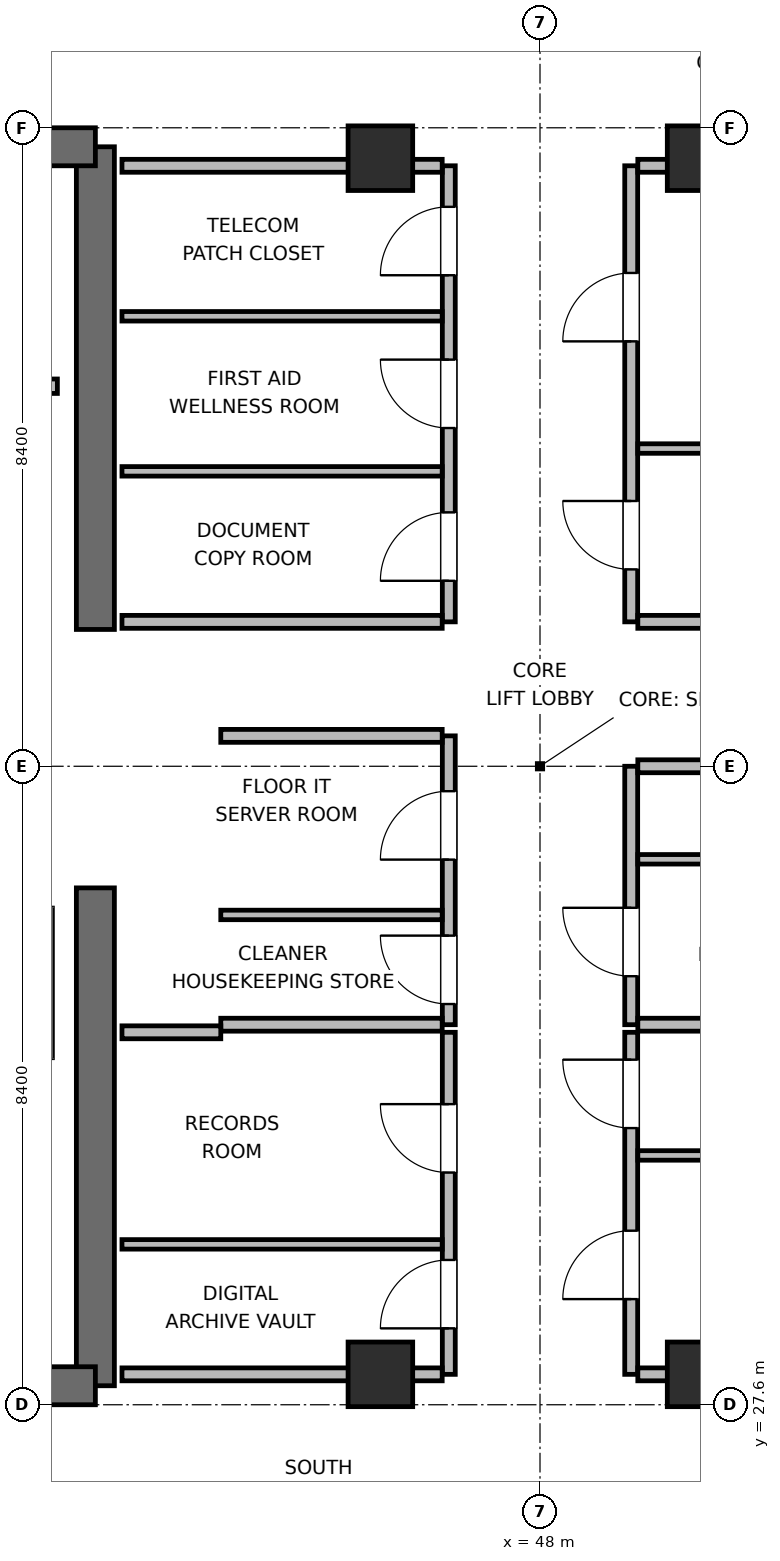
"""IFC4 building model, lengths in metres.
Left out: names, types, materials, properties, quantities, classifications, styles, units other than length and angle.
Written with IfcOpenShell. Run it as: python <this file> out.ifc"""

import sys

from ifc_helpers import new_model, si_unit, direction, frame, frame_2d, origin, origin_2d, place, context, subcontext, project, spatial, rectangle, extrude, element, fill, save


model = new_model("IFC4")
c1 = context("Model", 3, precision=1e-05, world=origin(), true_north=direction((0.0, 1.0)))
c2 = subcontext(c1, "Body", "Model", "MODEL_VIEW")
j1 = project(units=[si_unit("LENGTHUNIT", "METRE"), si_unit("PLANEANGLEUNIT", "RADIAN")], contexts=[c1])
p1 = place(None, origin())
s1 = spatial("IfcSite", under=j1, at=p1, CompositionType="ELEMENT")
p2 = place(p1, origin())
s2 = spatial("IfcBuilding", under=s1, at=p2, CompositionType="ELEMENT")
p3 = place(p2, frame((0.0, 0.0, 274.5)))
s3 = spatial("IfcBuildingStorey", under=s2, at=p3, CompositionType="ELEMENT", Elevation=274.5)
p4 = place(p3, frame((42.15, 27.85, 0.0), z_axis=(0.0, 0.0, 1.0), x_axis=(0.0, 1.0, 0.0)))
e1 = element("IfcWall", 1, at=p4, inside=s3, PredefinedType="SHEAR", context=c2, shape_type="SweptSolid", body=[
    extrude(rectangle(XDim=6.55, YDim=0.5, at=frame_2d((3.275, 0.0))), origin(), (0.0, 0.0, 1.0), 3.9),
])
p5 = place(p3, frame((42.15, 37.8, 0.0), z_axis=(0.0, 0.0, 1.0), x_axis=(0.0, 1.0, 0.0)))
e2 = element("IfcWall", 2, at=p5, inside=s3, PredefinedType="SHEAR", context=c2, shape_type="SweptSolid", body=[
    extrude(rectangle(XDim=6.35, YDim=0.5, at=frame_2d((3.175, 0.0))), origin(), (0.0, 0.0, 1.0), 3.9),
])
p6 = place(p3, frame((32.65, 27.85, 0.0), z_axis=(0.0, 0.0, 1.0), x_axis=(1.0, 0.0, 0.0)))
e3 = element("IfcWall", 3, at=p6, inside=s3, PredefinedType="SHEAR", context=c2, shape_type="SweptSolid", body=[
    extrude(rectangle(XDim=9.5, YDim=0.5, at=frame_2d((4.75, 0.0))), origin(), (0.0, 0.0, 1.0), 3.9),
])
p7 = place(p6, frame((5.075, 0.0, 0.0)))
e4 = element("IfcOpeningElement", 4, at=p7, cuts=e3, PredefinedType="OPENING", context=c2, shape_type="SweptSolid", body=[
    extrude(rectangle(XDim=1.05, YDim=2.04, at=frame_2d((0.525, 1.02))), frame((0.0, 0.26, 0.0), z_axis=(0.0, -1.0, 0.0), x_axis=(1.0, 0.0, 0.0)), (0.0, 0.0, 1.0), 0.52),
])
p8 = place(p3, frame((32.65, 44.15, 0.0), z_axis=(0.0, 0.0, 1.0), x_axis=(1.0, 0.0, 0.0)))
e5 = element("IfcWall", 5, at=p8, inside=s3, PredefinedType="SHEAR", context=c2, shape_type="SweptSolid", body=[
    extrude(rectangle(XDim=9.5, YDim=0.5, at=frame_2d((4.75, 0.0))), origin(), (0.0, 0.0, 1.0), 3.9),
])
p9 = place(p8, frame((1.075, 0.0, 0.0)))
e6 = element("IfcOpeningElement", 6, at=p9, cuts=e5, PredefinedType="OPENING", context=c2, shape_type="SweptSolid", body=[
    extrude(rectangle(XDim=0.95, YDim=2.04, at=frame_2d((0.475, 1.02))), frame((0.0, 0.26, 0.0), z_axis=(0.0, -1.0, 0.0), x_axis=(1.0, 0.0, 0.0)), (0.0, 0.0, 1.0), 0.52),
])
p10 = place(p8, frame((4.325, 0.0, 0.0)))
e7 = element("IfcOpeningElement", 7, at=p10, cuts=e5, PredefinedType="OPENING", context=c2, shape_type="SweptSolid", body=[
    extrude(rectangle(XDim=0.9, YDim=2.02, at=frame_2d((0.45, 1.01))), frame((0.0, 0.26, 0.0), z_axis=(0.0, -1.0, 0.0), x_axis=(1.0, 0.0, 0.0)), (0.0, 0.0, 1.0), 0.52),
])
p11 = place(p8, frame((7.225, 0.0, 0.0)))
e8 = element("IfcOpeningElement", 8, at=p11, cuts=e5, PredefinedType="OPENING", context=c2, shape_type="SweptSolid", body=[
    extrude(rectangle(XDim=0.9, YDim=2.02, at=frame_2d((0.45, 1.01))), frame((0.0, 0.26, 0.0), z_axis=(0.0, -1.0, 0.0), x_axis=(1.0, 0.0, 0.0)), (0.0, 0.0, 1.0), 0.52),
])
for number, where, z_axis, x_axis in (
    (9, (45.9, 28.0, 0.0), (0.0, 0.0, 1.0), (1.0, 0.0, 0.0)),
    (10, (50.1, 28.0, 0.0), (0.0, 0.0, 1.0), (1.0, 0.0, 0.0)),
    (11, (45.9, 44.0, 0.0), (0.0, 0.0, 1.0), (1.0, 0.0, 0.0)),
    (12, (50.1, 44.0, 0.0), (0.0, 0.0, 1.0), (1.0, 0.0, 0.0)),
):
    element("IfcColumn", number, at=place(p3, frame(where, z_axis=z_axis, x_axis=x_axis)), inside=s3, PredefinedType="COLUMN", context=c2, shape_type="SweptSolid", body=[
        extrude(rectangle(XDim=0.85, YDim=0.85, at=origin_2d()), origin(), (0.0, 0.0, 1.0), 3.9),
    ])
p12 = place(p3, frame((33.15, 41.0, 0.0), z_axis=(0.0, 0.0, 1.0), x_axis=(1.0, 0.0, 0.0)))
e13 = element("IfcWall", 13, at=p12, inside=s3, PredefinedType="PLUMBINGWALL", context=c2, shape_type="SweptSolid", body=[
    extrude(rectangle(XDim=8.5, YDim=0.19, at=frame_2d((4.25, 0.0))), origin(), (0.0, 0.0, 1.0), 3.68),
])
p13 = place(p3, frame((46.8, 32.6, 0.0), z_axis=(0.0, 0.0, 1.0), x_axis=(0.0, 1.0, 0.0)))
e14 = element("IfcWall", 14, at=p13, inside=s3, PredefinedType="PARTITIONING", context=c2, shape_type="SweptSolid", body=[
    extrude(rectangle(XDim=3.8, YDim=0.17, at=frame_2d((1.9, 0.0))), origin(), (0.0, 0.0, 1.0), 3.68),
])
p14 = place(p13, frame((0.272, 0.0, 0.0)))
e15 = element("IfcOpeningElement", 15, at=p14, cuts=e14, PredefinedType="OPENING", context=c2, shape_type="SweptSolid", body=[
    extrude(rectangle(XDim=0.9, YDim=2.02, at=frame_2d((0.45, 1.01))), frame((0.0, 0.095, 0.0), z_axis=(0.0, -1.0, 0.0), x_axis=(1.0, 0.0, 0.0)), (0.0, 0.0, 1.0), 0.19),
])
p15 = place(p13, frame((2.172, 0.0, 0.0)))
e16 = element("IfcOpeningElement", 16, at=p15, cuts=e14, PredefinedType="OPENING", context=c2, shape_type="SweptSolid", body=[
    extrude(rectangle(XDim=0.9, YDim=2.02, at=frame_2d((0.45, 1.01))), frame((0.0, 0.095, 0.0), z_axis=(0.0, -1.0, 0.0), x_axis=(1.0, 0.0, 0.0)), (0.0, 0.0, 1.0), 0.19),
])
for number, where, z_axis, x_axis in (
    (17, (43.8, 32.6, 0.0), (0.0, 0.0, 1.0), (1.0, 0.0, 0.0)),
    (18, (43.8, 36.4, 0.0), (0.0, 0.0, 1.0), (1.0, 0.0, 0.0)),
):
    element("IfcWall", number, at=place(p3, frame(where, z_axis=z_axis, x_axis=x_axis)), inside=s3, PredefinedType="PARTITIONING", context=c2, shape_type="SweptSolid", body=[
        extrude(rectangle(XDim=2.913, YDim=0.17, at=frame_2d((1.457, 0.0))), origin(), (0.0, 0.0, 1.0), 3.68),
    ])
p16 = place(p3, frame((43.8, 34.044, 0.0), z_axis=(0.0, 0.0, 1.0), x_axis=(1.0, 0.0, 0.0)))
e19 = element("IfcWall", 19, at=p16, inside=s3, PredefinedType="PARTITIONING", context=c2, shape_type="SweptSolid", body=[
    extrude(rectangle(XDim=2.913, YDim=0.125, at=frame_2d((1.457, 0.0))), origin(), (0.0, 0.0, 1.0), 3.68),
])
p17 = place(p3, frame((49.2, 32.6, 0.0), z_axis=(0.0, 0.0, 1.0), x_axis=(0.0, 1.0, 0.0)))
e20 = element("IfcWall", 20, at=p17, inside=s3, PredefinedType="PARTITIONING", context=c2, shape_type="SweptSolid", body=[
    extrude(rectangle(XDim=3.4, YDim=0.17, at=frame_2d((1.7, 0.0))), origin(), (0.0, 0.0, 1.0), 3.68),
])
p18 = place(p17, frame((0.638, 0.0, 0.0)))
e21 = element("IfcOpeningElement", 21, at=p18, cuts=e20, PredefinedType="OPENING", context=c2, shape_type="SweptSolid", body=[
    extrude(rectangle(XDim=0.9, YDim=2.02, at=frame_2d((0.45, 1.01))), frame((0.0, 0.095, 0.0), z_axis=(0.0, -1.0, 0.0), x_axis=(1.0, 0.0, 0.0)), (0.0, 0.0, 1.0), 0.19),
])
for number, where, z_axis, x_axis in (
    (22, (49.287, 32.6, 0.0), (0.0, 0.0, 1.0), (1.0, 0.0, 0.0)),
    (23, (49.287, 36.0, 0.0), (0.0, 0.0, 1.0), (1.0, 0.0, 0.0)),
):
    element("IfcWall", number, at=place(p3, frame(where, z_axis=z_axis, x_axis=x_axis)), inside=s3, PredefinedType="PARTITIONING", context=c2, shape_type="SweptSolid", body=[
        extrude(rectangle(XDim=2.913, YDim=0.17, at=frame_2d((1.457, 0.0))), origin(), (0.0, 0.0, 1.0), 3.68),
    ])
p19 = place(p3, frame((49.287, 34.776, 0.0), z_axis=(0.0, 0.0, 1.0), x_axis=(1.0, 0.0, 0.0)))
e24 = element("IfcWall", 24, at=p19, inside=s3, PredefinedType="PARTITIONING", context=c2, shape_type="SweptSolid", body=[
    extrude(rectangle(XDim=2.913, YDim=0.125, at=frame_2d((1.457, 0.0))), origin(), (0.0, 0.0, 1.0), 3.68),
])
p20 = place(p3, frame((46.8, 28.0, 0.0), z_axis=(0.0, 0.0, 1.0), x_axis=(0.0, 1.0, 0.0)))
e25 = element("IfcWall", 25, at=p20, inside=s3, PredefinedType="PARTITIONING", context=c2, shape_type="SweptSolid", body=[
    extrude(rectangle(XDim=4.5, YDim=0.17, at=frame_2d((2.25, 0.0))), origin(), (0.0, 0.0, 1.0), 3.68),
])
p21 = place(p20, frame((0.605, 0.0, 0.0)))
e26 = element("IfcOpeningElement", 26, at=p21, cuts=e25, PredefinedType="OPENING", context=c2, shape_type="SweptSolid", body=[
    extrude(rectangle(XDim=0.9, YDim=2.02, at=frame_2d((0.45, 1.01))), frame((0.0, 0.095, 0.0), z_axis=(0.0, -1.0, 0.0), x_axis=(1.0, 0.0, 0.0)), (0.0, 0.0, 1.0), 0.19),
])
p22 = place(p20, frame((2.655, 0.0, 0.0)))
e27 = element("IfcOpeningElement", 27, at=p22, cuts=e25, PredefinedType="OPENING", context=c2, shape_type="SweptSolid", body=[
    extrude(rectangle(XDim=0.9, YDim=2.02, at=frame_2d((0.45, 1.01))), frame((0.0, 0.095, 0.0), z_axis=(0.0, -1.0, 0.0), x_axis=(1.0, 0.0, 0.0)), (0.0, 0.0, 1.0), 0.19),
])
p23 = place(p3, frame((42.5, 28.0, 0.0), z_axis=(0.0, 0.0, 1.0), x_axis=(1.0, 0.0, 0.0)))
e28 = element("IfcWall", 28, at=p23, inside=s3, PredefinedType="PARTITIONING", context=c2, shape_type="SweptSolid", body=[
    extrude(rectangle(XDim=4.213, YDim=0.17, at=frame_2d((2.106, 0.0))), origin(), (0.0, 0.0, 1.0), 2.765),
])
p24 = place(p3, frame((42.5, 32.5, 0.0), z_axis=(0.0, 0.0, 1.0), x_axis=(1.0, 0.0, 0.0)))
e29 = element("IfcWall", 29, at=p24, inside=s3, PredefinedType="PARTITIONING", context=c2, shape_type="SweptSolid", body=[
    extrude(rectangle(XDim=1.3, YDim=0.17, at=frame_2d((0.65, 0.0))), origin(), (0.0, 0.0, 1.0), 3.68),
])
p25 = place(p3, frame((42.5, 29.71, 0.0), z_axis=(0.0, 0.0, 1.0), x_axis=(1.0, 0.0, 0.0)))
e30 = element("IfcWall", 30, at=p25, inside=s3, PredefinedType="PARTITIONING", context=c2, shape_type="SweptSolid", body=[
    extrude(rectangle(XDim=4.213, YDim=0.125, at=frame_2d((2.106, 0.0))), origin(), (0.0, 0.0, 1.0), 3.68),
])
p26 = place(p3, frame((49.2, 28.0, 0.0), z_axis=(0.0, 0.0, 1.0), x_axis=(0.0, 1.0, 0.0)))
e31 = element("IfcWall", 31, at=p26, inside=s3, PredefinedType="PARTITIONING", context=c2, shape_type="SweptSolid", body=[
    extrude(rectangle(XDim=4.5, YDim=0.17, at=frame_2d((2.25, 0.0))), origin(), (0.0, 0.0, 1.0), 3.68),
])
p27 = place(p26, frame((0.99, 0.0, 0.0)))
e32 = element("IfcOpeningElement", 32, at=p27, cuts=e31, PredefinedType="OPENING", context=c2, shape_type="SweptSolid", body=[
    extrude(rectangle(XDim=0.9, YDim=2.02, at=frame_2d((0.45, 1.01))), frame((0.0, 0.095, 0.0), z_axis=(0.0, -1.0, 0.0), x_axis=(1.0, 0.0, 0.0)), (0.0, 0.0, 1.0), 0.19),
])
p28 = place(p26, frame((3.24, 0.0, 0.0)))
e33 = element("IfcOpeningElement", 33, at=p28, cuts=e31, PredefinedType="OPENING", context=c2, shape_type="SweptSolid", body=[
    extrude(rectangle(XDim=0.9, YDim=2.02, at=frame_2d((0.45, 1.01))), frame((0.0, 0.095, 0.0), z_axis=(0.0, -1.0, 0.0), x_axis=(1.0, 0.0, 0.0)), (0.0, 0.0, 1.0), 0.19),
])
p29 = place(p3, frame((49.287, 28.0, 0.0), z_axis=(0.0, 0.0, 1.0), x_axis=(1.0, 0.0, 0.0)))
e34 = element("IfcWall", 34, at=p29, inside=s3, PredefinedType="PARTITIONING", context=c2, shape_type="SweptSolid", body=[
    extrude(rectangle(XDim=4.213, YDim=0.17, at=frame_2d((2.106, 0.0))), origin(), (0.0, 0.0, 1.0), 2.765),
])
p30 = place(p3, frame((49.287, 30.88, 0.0), z_axis=(0.0, 0.0, 1.0), x_axis=(1.0, 0.0, 0.0)))
e35 = element("IfcWall", 35, at=p30, inside=s3, PredefinedType="PARTITIONING", context=c2, shape_type="SweptSolid", body=[
    extrude(rectangle(XDim=4.213, YDim=0.125, at=frame_2d((2.106, 0.0))), origin(), (0.0, 0.0, 1.0), 3.68),
])
p31 = place(p3, frame((46.8, 37.9, 0.0), z_axis=(0.0, 0.0, 1.0), x_axis=(0.0, 1.0, 0.0)))
e36 = element("IfcWall", 36, at=p31, inside=s3, PredefinedType="PARTITIONING", context=c2, shape_type="SweptSolid", body=[
    extrude(rectangle(XDim=6.0, YDim=0.17, at=frame_2d((3.0, 0.0))), origin(), (0.0, 0.0, 1.0), 3.68),
])
p32 = place(p31, frame((0.54, 0.0, 0.0)))
e37 = element("IfcOpeningElement", 37, at=p32, cuts=e36, PredefinedType="OPENING", context=c2, shape_type="SweptSolid", body=[
    extrude(rectangle(XDim=0.9, YDim=2.02, at=frame_2d((0.45, 1.01))), frame((0.0, 0.095, 0.0), z_axis=(0.0, -1.0, 0.0), x_axis=(1.0, 0.0, 0.0)), (0.0, 0.0, 1.0), 0.19),
])
p33 = place(p31, frame((2.55, 0.0, 0.0)))
e38 = element("IfcOpeningElement", 38, at=p33, cuts=e36, PredefinedType="OPENING", context=c2, shape_type="SweptSolid", body=[
    extrude(rectangle(XDim=0.9, YDim=2.02, at=frame_2d((0.45, 1.01))), frame((0.0, 0.095, 0.0), z_axis=(0.0, -1.0, 0.0), x_axis=(1.0, 0.0, 0.0)), (0.0, 0.0, 1.0), 0.19),
])
p34 = place(p31, frame((4.56, 0.0, 0.0)))
e39 = element("IfcOpeningElement", 39, at=p34, cuts=e36, PredefinedType="OPENING", context=c2, shape_type="SweptSolid", body=[
    extrude(rectangle(XDim=0.9, YDim=2.02, at=frame_2d((0.45, 1.01))), frame((0.0, 0.095, 0.0), z_axis=(0.0, -1.0, 0.0), x_axis=(1.0, 0.0, 0.0)), (0.0, 0.0, 1.0), 0.19),
])
p35 = place(p3, frame((42.5, 37.9, 0.0), z_axis=(0.0, 0.0, 1.0), x_axis=(1.0, 0.0, 0.0)))
e40 = element("IfcWall", 40, at=p35, inside=s3, PredefinedType="PARTITIONING", context=c2, shape_type="SweptSolid", body=[
    extrude(rectangle(XDim=4.213, YDim=0.17, at=frame_2d((2.106, 0.0))), origin(), (0.0, 0.0, 1.0), 3.68),
])
p36 = place(p3, frame((42.5, 43.9, 0.0), z_axis=(0.0, 0.0, 1.0), x_axis=(1.0, 0.0, 0.0)))
e41 = element("IfcWall", 41, at=p36, inside=s3, PredefinedType="PARTITIONING", context=c2, shape_type="SweptSolid", body=[
    extrude(rectangle(XDim=4.213, YDim=0.17, at=frame_2d((2.106, 0.0))), origin(), (0.0, 0.0, 1.0), 2.765),
])
for number, where, z_axis, x_axis in (
    (42, (42.5, 39.88, 0.0), (0.0, 0.0, 1.0), (1.0, 0.0, 0.0)),
    (43, (42.5, 41.92, 0.0), (0.0, 0.0, 1.0), (1.0, 0.0, 0.0)),
):
    element("IfcWall", number, at=place(p3, frame(where, z_axis=z_axis, x_axis=x_axis)), inside=s3, PredefinedType="PARTITIONING", context=c2, shape_type="SweptSolid", body=[
        extrude(rectangle(XDim=4.213, YDim=0.125, at=frame_2d((2.106, 0.0))), origin(), (0.0, 0.0, 1.0), 3.68),
    ])
p37 = place(p3, frame((49.2, 37.9, 0.0), z_axis=(0.0, 0.0, 1.0), x_axis=(0.0, 1.0, 0.0)))
e44 = element("IfcWall", 44, at=p37, inside=s3, PredefinedType="PARTITIONING", context=c2, shape_type="SweptSolid", body=[
    extrude(rectangle(XDim=6.0, YDim=0.17, at=frame_2d((3.0, 0.0))), origin(), (0.0, 0.0, 1.0), 3.68),
])
p38 = place(p37, frame((0.69, 0.0, 0.0)))
e45 = element("IfcOpeningElement", 45, at=p38, cuts=e44, PredefinedType="OPENING", context=c2, shape_type="SweptSolid", body=[
    extrude(rectangle(XDim=0.9, YDim=2.02, at=frame_2d((0.45, 1.01))), frame((0.0, 0.095, 0.0), z_axis=(0.0, -1.0, 0.0), x_axis=(1.0, 0.0, 0.0)), (0.0, 0.0, 1.0), 0.19),
])
p39 = place(p37, frame((3.69, 0.0, 0.0)))
e46 = element("IfcOpeningElement", 46, at=p39, cuts=e44, PredefinedType="OPENING", context=c2, shape_type="SweptSolid", body=[
    extrude(rectangle(XDim=0.9, YDim=2.02, at=frame_2d((0.45, 1.01))), frame((0.0, 0.095, 0.0), z_axis=(0.0, -1.0, 0.0), x_axis=(1.0, 0.0, 0.0)), (0.0, 0.0, 1.0), 0.19),
])
p40 = place(p3, frame((49.287, 37.9, 0.0), z_axis=(0.0, 0.0, 1.0), x_axis=(1.0, 0.0, 0.0)))
e47 = element("IfcWall", 47, at=p40, inside=s3, PredefinedType="PARTITIONING", context=c2, shape_type="SweptSolid", body=[
    extrude(rectangle(XDim=4.113, YDim=0.17, at=frame_2d((2.056, 0.0))), origin(), (0.0, 0.0, 1.0), 3.68),
])
p41 = place(p3, frame((49.287, 43.9, 0.0), z_axis=(0.0, 0.0, 1.0), x_axis=(1.0, 0.0, 0.0)))
e48 = element("IfcWall", 48, at=p41, inside=s3, PredefinedType="PARTITIONING", context=c2, shape_type="SweptSolid", body=[
    extrude(rectangle(XDim=4.113, YDim=0.17, at=frame_2d((2.056, 0.0))), origin(), (0.0, 0.0, 1.0), 2.765),
])
p42 = place(p3, frame((49.287, 40.18, 0.0), z_axis=(0.0, 0.0, 1.0), x_axis=(1.0, 0.0, 0.0)))
e49 = element("IfcWall", 49, at=p42, inside=s3, PredefinedType="PARTITIONING", context=c2, shape_type="SweptSolid", body=[
    extrude(rectangle(XDim=4.113, YDim=0.125, at=frame_2d((2.056, 0.0))), origin(), (0.0, 0.0, 1.0), 3.68),
])
p43 = place(p14, origin())
e50 = element("IfcDoor", 50, at=p43, inside=s3, OperationType="SINGLE_SWING_RIGHT", PredefinedType="DOOR", context=c2, shape_type="SweptSolid", body=[
    extrude(rectangle(XDim=0.9, YDim=2.02, at=frame_2d((0.45, 1.01))), frame((0.0, 0.025, 0.0), z_axis=(0.0, -1.0, 0.0), x_axis=(1.0, 0.0, 0.0)), (0.0, 0.0, 1.0), 0.05),
])
fill(e15, e50)
p44 = place(p15, origin())
e51 = element("IfcDoor", 51, at=p44, inside=s3, OperationType="SINGLE_SWING_LEFT", PredefinedType="DOOR", context=c2, shape_type="SweptSolid", body=[
    extrude(rectangle(XDim=0.9, YDim=2.02, at=frame_2d((0.45, 1.01))), frame((0.0, 0.025, 0.0), z_axis=(0.0, -1.0, 0.0), x_axis=(1.0, 0.0, 0.0)), (0.0, 0.0, 1.0), 0.05),
])
fill(e16, e51)
p45 = place(p18, origin())
e52 = element("IfcDoor", 52, at=p45, inside=s3, OperationType="SINGLE_SWING_RIGHT", PredefinedType="DOOR", context=c2, shape_type="SweptSolid", body=[
    extrude(rectangle(XDim=0.9, YDim=2.02, at=frame_2d((0.45, 1.01))), frame((0.0, 0.025, 0.0), z_axis=(0.0, -1.0, 0.0), x_axis=(1.0, 0.0, 0.0)), (0.0, 0.0, 1.0), 0.05),
])
fill(e21, e52)
p46 = place(p21, origin())
e53 = element("IfcDoor", 53, at=p46, inside=s3, OperationType="SINGLE_SWING_LEFT", PredefinedType="DOOR", context=c2, shape_type="SweptSolid", body=[
    extrude(rectangle(XDim=0.9, YDim=2.02, at=frame_2d((0.45, 1.01))), frame((0.0, 0.025, 0.0), z_axis=(0.0, -1.0, 0.0), x_axis=(1.0, 0.0, 0.0)), (0.0, 0.0, 1.0), 0.05),
])
fill(e26, e53)
p47 = place(p22, origin())
e54 = element("IfcDoor", 54, at=p47, inside=s3, OperationType="SINGLE_SWING_RIGHT", PredefinedType="DOOR", context=c2, shape_type="SweptSolid", body=[
    extrude(rectangle(XDim=0.9, YDim=2.02, at=frame_2d((0.45, 1.01))), frame((0.0, 0.025, 0.0), z_axis=(0.0, -1.0, 0.0), x_axis=(1.0, 0.0, 0.0)), (0.0, 0.0, 1.0), 0.05),
])
fill(e27, e54)
p48 = place(p27, origin())
e55 = element("IfcDoor", 55, at=p48, inside=s3, OperationType="SINGLE_SWING_LEFT", PredefinedType="DOOR", context=c2, shape_type="SweptSolid", body=[
    extrude(rectangle(XDim=0.9, YDim=2.02, at=frame_2d((0.45, 1.01))), frame((0.0, 0.025, 0.0), z_axis=(0.0, -1.0, 0.0), x_axis=(1.0, 0.0, 0.0)), (0.0, 0.0, 1.0), 0.05),
])
fill(e32, e55)
p49 = place(p28, origin())
e56 = element("IfcDoor", 56, at=p49, inside=s3, OperationType="SINGLE_SWING_RIGHT", PredefinedType="DOOR", context=c2, shape_type="SweptSolid", body=[
    extrude(rectangle(XDim=0.9, YDim=2.02, at=frame_2d((0.45, 1.01))), frame((0.0, 0.025, 0.0), z_axis=(0.0, -1.0, 0.0), x_axis=(1.0, 0.0, 0.0)), (0.0, 0.0, 1.0), 0.05),
])
fill(e33, e56)
p50 = place(p32, origin())
e57 = element("IfcDoor", 57, at=p50, inside=s3, OperationType="SINGLE_SWING_LEFT", PredefinedType="DOOR", context=c2, shape_type="SweptSolid", body=[
    extrude(rectangle(XDim=0.9, YDim=2.02, at=frame_2d((0.45, 1.01))), frame((0.0, 0.025, 0.0), z_axis=(0.0, -1.0, 0.0), x_axis=(1.0, 0.0, 0.0)), (0.0, 0.0, 1.0), 0.05),
])
fill(e37, e57)
p51 = place(p33, origin())
e58 = element("IfcDoor", 58, at=p51, inside=s3, OperationType="SINGLE_SWING_RIGHT", PredefinedType="DOOR", context=c2, shape_type="SweptSolid", body=[
    extrude(rectangle(XDim=0.9, YDim=2.02, at=frame_2d((0.45, 1.01))), frame((0.0, 0.025, 0.0), z_axis=(0.0, -1.0, 0.0), x_axis=(1.0, 0.0, 0.0)), (0.0, 0.0, 1.0), 0.05),
])
fill(e38, e58)
p52 = place(p34, origin())
e59 = element("IfcDoor", 59, at=p52, inside=s3, OperationType="SINGLE_SWING_LEFT", PredefinedType="DOOR", context=c2, shape_type="SweptSolid", body=[
    extrude(rectangle(XDim=0.9, YDim=2.02, at=frame_2d((0.45, 1.01))), frame((0.0, 0.025, 0.0), z_axis=(0.0, -1.0, 0.0), x_axis=(1.0, 0.0, 0.0)), (0.0, 0.0, 1.0), 0.05),
])
fill(e39, e59)
p53 = place(p38, origin())
e60 = element("IfcDoor", 60, at=p53, inside=s3, OperationType="SINGLE_SWING_RIGHT", PredefinedType="DOOR", context=c2, shape_type="SweptSolid", body=[
    extrude(rectangle(XDim=0.9, YDim=2.02, at=frame_2d((0.45, 1.01))), frame((0.0, 0.025, 0.0), z_axis=(0.0, -1.0, 0.0), x_axis=(1.0, 0.0, 0.0)), (0.0, 0.0, 1.0), 0.05),
])
fill(e45, e60)
p54 = place(p39, origin())
e61 = element("IfcDoor", 61, at=p54, inside=s3, OperationType="SINGLE_SWING_LEFT", PredefinedType="DOOR", context=c2, shape_type="SweptSolid", body=[
    extrude(rectangle(XDim=0.9, YDim=2.02, at=frame_2d((0.45, 1.01))), frame((0.0, 0.025, 0.0), z_axis=(0.0, -1.0, 0.0), x_axis=(1.0, 0.0, 0.0)), (0.0, 0.0, 1.0), 0.05),
])
fill(e46, e61)
save(model, sys.argv[1])
